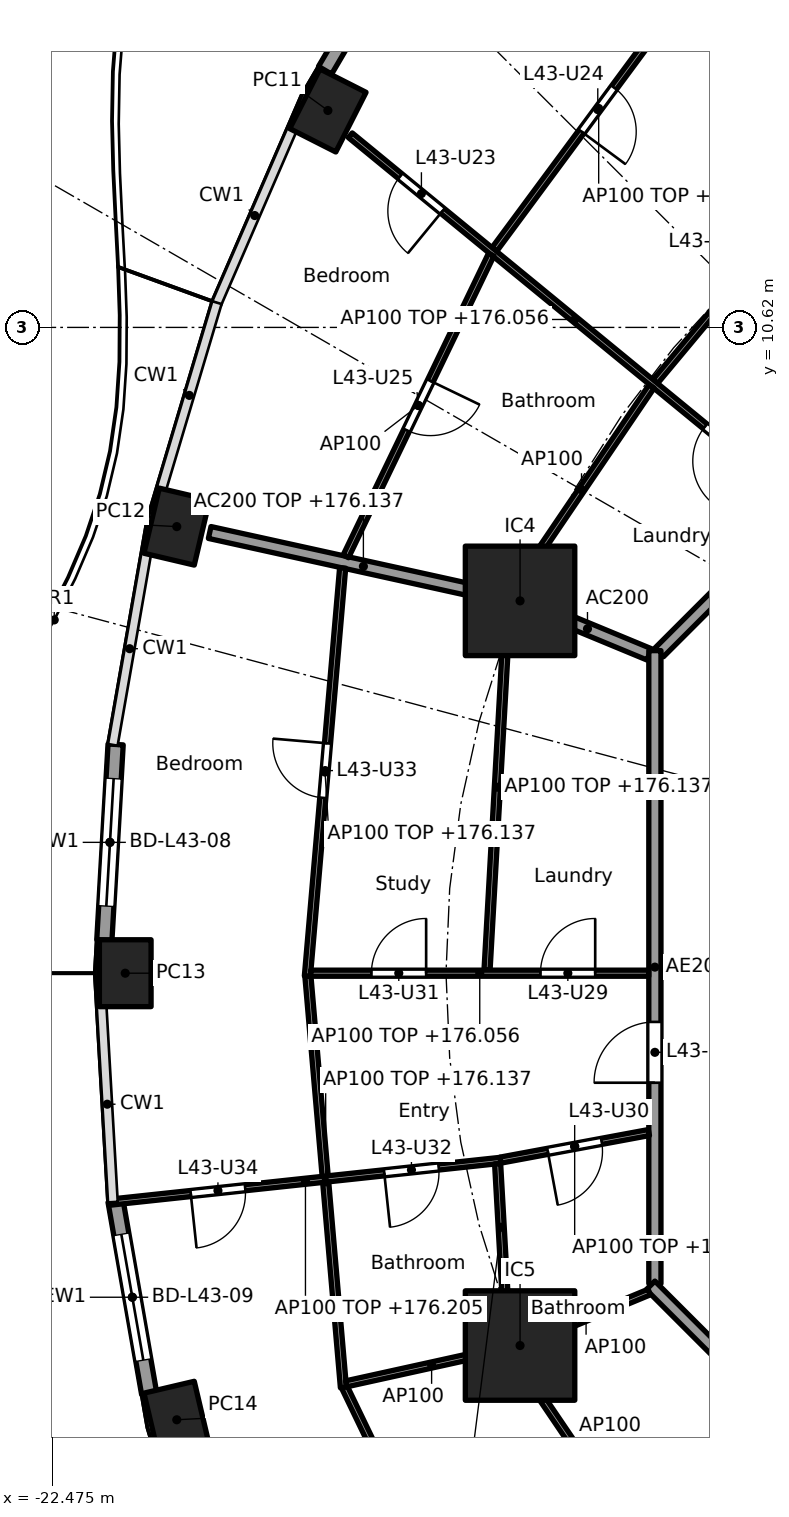
"""IFC4 building model, lengths in metres.
Left out: names, types, materials, properties, quantities, classifications, styles, units other than length and angle.
Written with IfcOpenShell. Run it as: python <this file> out.ifc"""

import sys

from ifc_helpers import new_model, si_unit, direction, frame, frame_2d, origin, origin_2d, place, context, subcontext, project, spatial, rectangle, hollow_rectangle, extrude, element, fill, save


model = new_model("IFC4")
c1 = context("Model", 3, precision=1e-05, world=origin(), true_north=direction((0.0, 1.0)))
c2 = subcontext(c1, "Body", "Model", "MODEL_VIEW")
j1 = project(units=[si_unit("LENGTHUNIT", "METRE"), si_unit("PLANEANGLEUNIT", "RADIAN")], contexts=[c1])
p1 = place(None, origin())
s1 = spatial("IfcSite", under=j1, at=p1, CompositionType="ELEMENT")
p2 = place(p1, origin())
s2 = spatial("IfcBuilding", under=s1, at=p2, CompositionType="ELEMENT")
p3 = place(p2, frame((0.0, 0.0, 173.3)))
s3 = spatial("IfcBuildingStorey", under=s2, at=p3, CompositionType="ELEMENT", Elevation=173.3)
for number, where, z_axis, x_axis in (
    (1, (-17.942, 14.188, 0.0), (0.0, 0.0, 1.0), (-0.452, -0.892, 0.0)),
    (2, (-20.427, 7.344, 0.0), (0.0, 0.0, 1.0), (-0.229, -0.973, 0.0)),
    (3, (-21.275, 0.0, 0.0), (0.0, 0.0, 1.0), (0.0, -1.0, 0.0)),
    (4, (-20.427, -7.344, 0.0), (0.0, 0.0, 1.0), (0.229, -0.973, 0.0)),
):
    element("IfcColumn", number, at=place(p3, frame(where, z_axis=z_axis, x_axis=x_axis)), inside=s3, PredefinedType="COLUMN", context=c2, shape_type="SweptSolid", body=[
        extrude(hollow_rectangle(XDim=1.1, YDim=0.85, WallThickness=0.036, at=origin_2d()), origin(), (0.0, 0.0, 1.0), 3.7),
    ])
for number, where, z_axis, x_axis in (
    (5, (-14.782, 6.123, 0.0), (0.0, 0.0, 1.0), (1.0, 0.0, 0.0)),
    (6, (-14.782, -6.123, 0.0), (0.0, 0.0, 1.0), (1.0, 0.0, 0.0)),
):
    element("IfcColumn", number, at=place(p3, frame(where, z_axis=z_axis, x_axis=x_axis)), inside=s3, PredefinedType="COLUMN", context=c2, shape_type="SweptSolid", body=[
        extrude(rectangle(XDim=1.8, YDim=1.8, at=origin_2d()), origin(), (0.0, 0.0, 1.0), 3.7),
    ])
p4 = place(p3, frame((-17.989, 14.848, 0.0), z_axis=(0.0, 0.0, 1.0), x_axis=(0.506309086483, 0.862352079458, 0.0)))
e7 = element("IfcWall", 7, at=p4, inside=s3, PredefinedType="SOLIDWALL", context=c2, shape_type="SweptSolid", body=[
    extrude(rectangle(XDim=3.092, YDim=0.25, at=frame_2d((1.546, 0.0))), origin(), (0.0, 0.0, 1.0), 3.44),
])
p5 = place(p4, frame((0.496, 0.0, 0.0)))
e8 = element("IfcOpeningElement", 8, at=p5, cuts=e7, PredefinedType="OPENING", context=c2, shape_type="SweptSolid", body=[
    extrude(rectangle(XDim=2.1, YDim=2.4, at=frame_2d((1.05, 1.2))), frame((0.0, 0.135, 0.0), z_axis=(0.0, -1.0, 0.0), x_axis=(1.0, 0.0, 0.0)), (0.0, 0.0, 1.0), 0.27),
])
p6 = place(p3, frame((-21.619, 0.542, 0.0), z_axis=(0.0, 0.0, 1.0), x_axis=(0.057532692854, 0.998343622834, 0.0)))
e9 = element("IfcWall", 9, at=p6, inside=s3, PredefinedType="SOLIDWALL", context=c2, shape_type="SweptSolid", body=[
    extrude(rectangle(XDim=3.225, YDim=0.25, at=frame_2d((1.613, 0.0))), origin(), (0.0, 0.0, 1.0), 3.44),
])
p7 = place(p6, frame((0.562, 0.0, 0.0)))
e10 = element("IfcOpeningElement", 10, at=p7, cuts=e9, PredefinedType="OPENING", context=c2, shape_type="SweptSolid", body=[
    extrude(rectangle(XDim=2.1, YDim=2.4, at=frame_2d((1.05, 1.2))), frame((0.0, 0.135, 0.0), z_axis=(0.0, -1.0, 0.0), x_axis=(1.0, 0.0, 0.0)), (0.0, 0.0, 1.0), 0.27),
])
p8 = place(p3, frame((-20.882, -6.91, 0.0), z_axis=(0.0, 0.0, 1.0), x_axis=(-0.172223552479, 0.98505789067, 0.0)))
e11 = element("IfcWall", 11, at=p8, inside=s3, PredefinedType="SOLIDWALL", context=c2, shape_type="SweptSolid", body=[
    extrude(rectangle(XDim=3.211, YDim=0.25, at=frame_2d((1.605, 0.0))), origin(), (0.0, 0.0, 1.0), 3.44),
])
p9 = place(p8, frame((0.555, 0.0, 0.0)))
e12 = element("IfcOpeningElement", 12, at=p9, cuts=e11, PredefinedType="OPENING", context=c2, shape_type="SweptSolid", body=[
    extrude(rectangle(XDim=2.1, YDim=2.4, at=frame_2d((1.05, 1.2))), frame((0.0, 0.135, 0.0), z_axis=(0.0, -1.0, 0.0), x_axis=(1.0, 0.0, 0.0)), (0.0, 0.0, 1.0), 0.27),
])
p10 = place(p3, frame((-12.657, 5.243, 0.0), z_axis=(0.0, 0.0, 1.0), x_axis=(-0.923859888513, 0.38273085373, 0.0)))
e13 = element("IfcWall", 13, at=p10, inside=s3, PredefinedType="PARTITIONING", context=c2, shape_type="SweptSolid", body=[
    extrude(rectangle(XDim=2.199, YDim=0.2, at=frame_2d((1.1, 0.0))), origin(), (0.0, 0.0, 1.0), 3.44),
])
p11 = place(p3, frame((-14.831, 6.134, 0.0), z_axis=(0.0, 0.0, 1.0), x_axis=(-0.976568396888, 0.215207263354, 0.0)))
e14 = element("IfcWall", 14, at=p11, inside=s3, PredefinedType="PARTITIONING", context=c2, shape_type="SweptSolid", body=[
    extrude(rectangle(XDim=5.177, YDim=0.2, at=frame_2d((2.588, 0.0))), origin(), (0.0, 0.0, 1.0), 2.837),
])
p12 = place(p3, frame((-5.275, 12.494, 0.0), z_axis=(0.0, 0.0, 1.0), x_axis=(-0.707106781187, -0.707106781187, 0.0)))
e15 = element("IfcWall", 15, at=p12, inside=s3, PredefinedType="PARTITIONING", context=c2, shape_type="SweptSolid", body=[
    extrude(rectangle(XDim=10.209, YDim=0.2, at=frame_2d((5.104, 0.0))), origin(), (0.0, 0.0, 1.0), 3.44),
])
p13 = place(p3, frame((-12.565, 5.304, 0.0), z_axis=(0.0, 0.0, 1.0), x_axis=(0.0, -1.0, 0.0)))
e16 = element("IfcWall", 16, at=p13, inside=s3, PredefinedType="PARTITIONING", context=c2, shape_type="SweptSolid", body=[
    extrude(rectangle(XDim=10.409, YDim=0.2, at=frame_2d((5.205, 0.0))), origin(), (0.0, 0.0, 1.0), 3.44),
])
p14 = place(p13, frame((6.106, 0.0, 0.0)))
e17 = element("IfcOpeningElement", 17, at=p14, cuts=e16, PredefinedType="OPENING", context=c2, shape_type="SweptSolid", body=[
    extrude(rectangle(XDim=1.0, YDim=2.1, at=frame_2d((0.5, 1.05))), frame((0.0, 0.11, 0.0), z_axis=(0.0, -1.0, 0.0), x_axis=(1.0, 0.0, 0.0)), (0.0, 0.0, 1.0), 0.22),
])
p15 = place(p3, frame((-12.635, -5.134, 0.0), z_axis=(0.0, 0.0, 1.0), x_axis=(0.707106781187, -0.707106781187, 0.0)))
e18 = element("IfcWall", 18, at=p15, inside=s3, PredefinedType="PARTITIONING", context=c2, shape_type="SweptSolid", body=[
    extrude(rectangle(XDim=10.609, YDim=0.2, at=frame_2d((5.305, 0.0))), origin(), (0.0, 0.0, 1.0), 3.44),
])
p16 = place(p3, frame((-9.631, 13.242, 0.0), z_axis=(0.0, 0.0, 1.0), x_axis=(-0.640315711982, -0.768111833647, 0.0)))
e19 = element("IfcWall", 19, at=p16, inside=s3, PredefinedType="PARTITIONING", context=c2, shape_type="SweptSolid", body=[
    extrude(rectangle(XDim=4.572, YDim=0.1, at=frame_2d((2.286, 0.0))), origin(), (0.0, 0.0, 1.0), 2.837),
])
p17 = place(p16, frame((1.861, 0.0, 0.0)))
e20 = element("IfcOpeningElement", 20, at=p17, cuts=e19, PredefinedType="OPENING", context=c2, shape_type="SweptSolid", body=[
    extrude(rectangle(XDim=0.9, YDim=2.1, at=frame_2d((0.45, 1.05))), frame((0.0, 0.06, 0.0), z_axis=(0.0, -1.0, 0.0), x_axis=(1.0, 0.0, 0.0)), (0.0, 0.0, 1.0), 0.12),
])
p18 = place(p3, frame((-11.773, 16.542, 0.0), z_axis=(0.0, 0.0, 1.0), x_axis=(-0.594694305999, -0.803951915485, 0.0)))
e21 = element("IfcWall", 21, at=p18, inside=s3, PredefinedType="PARTITIONING", context=c2, shape_type="SweptSolid", body=[
    extrude(rectangle(XDim=5.772, YDim=0.1, at=frame_2d((2.886, 0.0))), origin(), (0.0, 0.0, 1.0), 2.837),
])
p19 = place(p18, frame((2.461, 0.0, 0.0)))
e22 = element("IfcOpeningElement", 22, at=p19, cuts=e21, PredefinedType="OPENING", context=c2, shape_type="SweptSolid", body=[
    extrude(rectangle(XDim=0.9, YDim=2.1, at=frame_2d((0.45, 1.05))), frame((0.0, 0.06, 0.0), z_axis=(0.0, -1.0, 0.0), x_axis=(1.0, 0.0, 0.0)), (0.0, 0.0, 1.0), 0.12),
])
p20 = place(p3, frame((-10.189, 7.721, 0.0), z_axis=(0.0, 0.0, 1.0), x_axis=(-0.773134429339, 0.634242188892, 0.0)))
e23 = element("IfcWall", 23, at=p20, inside=s3, PredefinedType="PARTITIONING", context=c2, shape_type="SweptSolid", body=[
    extrude(rectangle(XDim=9.552, YDim=0.1, at=frame_2d((4.776, 0.0))), origin(), (0.0, 0.0, 1.0), 2.756),
])
p21 = place(p20, frame((7.59, 0.0, 0.0)))
e24 = element("IfcOpeningElement", 24, at=p21, cuts=e23, PredefinedType="OPENING", context=c2, shape_type="SweptSolid", body=[
    extrude(rectangle(XDim=0.9, YDim=2.1, at=frame_2d((0.45, 1.05))), frame((0.0, 0.06, 0.0), z_axis=(0.0, -1.0, 0.0), x_axis=(1.0, 0.0, 0.0)), (0.0, 0.0, 1.0), 0.12),
])
p22 = place(p20, frame((1.104, 0.0, 0.0)))
e25 = element("IfcOpeningElement", 25, at=p22, cuts=e23, PredefinedType="OPENING", context=c2, shape_type="SweptSolid", body=[
    extrude(rectangle(XDim=0.9, YDim=2.1, at=frame_2d((0.45, 1.05))), frame((0.0, 0.06, 0.0), z_axis=(0.0, -1.0, 0.0), x_axis=(1.0, 0.0, 0.0)), (0.0, 0.0, 1.0), 0.12),
])
p23 = place(p3, frame((-12.619, 9.65, 0.0), z_axis=(0.0, 0.0, 1.0), x_axis=(-0.561046521684, -0.82778427172, 0.0)))
e26 = element("IfcWall", 26, at=p23, inside=s3, PredefinedType="PARTITIONING", context=c2, shape_type="SweptSolid", body=[
    extrude(rectangle(XDim=4.109, YDim=0.1, at=frame_2d((2.054, 0.0))), origin(), (0.0, 0.0, 1.0), 3.44),
])
p24 = place(p3, frame((-15.257, 11.816, 0.0), z_axis=(0.0, 0.0, 1.0), x_axis=(-0.434027506504, -0.900899619046, 0.0)))
e27 = element("IfcWall", 27, at=p24, inside=s3, PredefinedType="PARTITIONING", context=c2, shape_type="SweptSolid", body=[
    extrude(rectangle(XDim=5.508, YDim=0.1, at=frame_2d((2.754, 0.0))), origin(), (0.0, 0.0, 1.0), 3.44),
])
p25 = place(p24, frame((2.304, 0.0, 0.0)))
e28 = element("IfcOpeningElement", 28, at=p25, cuts=e27, PredefinedType="OPENING", context=c2, shape_type="SweptSolid", body=[
    extrude(rectangle(XDim=0.9, YDim=2.1, at=frame_2d((0.45, 1.05))), frame((0.0, 0.06, 0.0), z_axis=(0.0, -1.0, 0.0), x_axis=(1.0, 0.0, 0.0)), (0.0, 0.0, 1.0), 0.12),
])
p26 = place(p3, frame((-14.986, 6.067, 0.0), z_axis=(0.0, 0.0, 1.0), x_axis=(-0.056311398802, -0.998413254302, 0.0)))
e29 = element("IfcWall", 29, at=p26, inside=s3, PredefinedType="PARTITIONING", context=c2, shape_type="SweptSolid", body=[
    extrude(rectangle(XDim=6.026, YDim=0.1, at=frame_2d((3.013, 0.0))), origin(), (0.0, 0.0, 1.0), 2.837),
])
p27 = place(p3, frame((-17.7, 6.664, 0.0), z_axis=(0.0, 0.0, 1.0), x_axis=(-0.086004282666, -0.996294767307, 0.0)))
e30 = element("IfcWall", 30, at=p27, inside=s3, PredefinedType="PARTITIONING", context=c2, shape_type="SweptSolid", body=[
    extrude(rectangle(XDim=6.739, YDim=0.1, at=frame_2d((3.37, 0.0))), origin(), (0.0, 0.0, 1.0), 2.837),
])
p28 = place(p27, frame((2.895, 0.0, 0.0)))
e31 = element("IfcOpeningElement", 31, at=p28, cuts=e30, PredefinedType="OPENING", context=c2, shape_type="SweptSolid", body=[
    extrude(rectangle(XDim=0.9, YDim=2.1, at=frame_2d((0.45, 1.05))), frame((0.0, 0.06, 0.0), z_axis=(0.0, -1.0, 0.0), x_axis=(1.0, 0.0, 0.0)), (0.0, 0.0, 1.0), 0.12),
])
p29 = place(p3, frame((-12.665, 0.0, 0.0), z_axis=(0.0, 0.0, 1.0), x_axis=(-1.0, 0.0, 0.0)))
e32 = element("IfcWall", 32, at=p29, inside=s3, PredefinedType="PARTITIONING", context=c2, shape_type="SweptSolid", body=[
    extrude(rectangle(XDim=5.56, YDim=0.1, at=frame_2d((2.78, 0.0))), origin(), (0.0, 0.0, 1.0), 2.756),
])
p30 = place(p29, frame((0.882, 0.0, 0.0)))
e33 = element("IfcOpeningElement", 33, at=p30, cuts=e32, PredefinedType="OPENING", context=c2, shape_type="SweptSolid", body=[
    extrude(rectangle(XDim=0.9, YDim=2.1, at=frame_2d((0.45, 1.05))), frame((0.0, 0.06, 0.0), z_axis=(0.0, -1.0, 0.0), x_axis=(1.0, 0.0, 0.0)), (0.0, 0.0, 1.0), 0.12),
])
p31 = place(p29, frame((3.662, 0.0, 0.0)))
e34 = element("IfcOpeningElement", 34, at=p31, cuts=e32, PredefinedType="OPENING", context=c2, shape_type="SweptSolid", body=[
    extrude(rectangle(XDim=0.9, YDim=2.1, at=frame_2d((0.45, 1.05))), frame((0.0, 0.06, 0.0), z_axis=(0.0, -1.0, 0.0), x_axis=(1.0, 0.0, 0.0)), (0.0, 0.0, 1.0), 0.12),
])
p32 = place(p3, frame((-18.271, -0.05, 0.0), z_axis=(0.0, 0.0, 1.0), x_axis=(0.086018199227, -0.996293565874, 0.0)))
e35 = element("IfcWall", 35, at=p32, inside=s3, PredefinedType="PARTITIONING", context=c2, shape_type="SweptSolid", body=[
    extrude(rectangle(XDim=6.789, YDim=0.1, at=frame_2d((3.395, 0.0))), origin(), (0.0, 0.0, 1.0), 2.837),
])
p33 = place(p3, frame((-12.663, -2.621, 0.0), z_axis=(0.0, 0.0, 1.0), x_axis=(-0.983176884312, -0.182655999505, 0.0)))
e36 = element("IfcWall", 36, at=p33, inside=s3, PredefinedType="PARTITIONING", context=c2, shape_type="SweptSolid", body=[
    extrude(rectangle(XDim=2.483, YDim=0.1, at=frame_2d((1.242, 0.0))), origin(), (0.0, 0.0, 1.0), 2.756),
])
p34 = place(p33, frame((0.792, 0.0, 0.0)))
e37 = element("IfcOpeningElement", 37, at=p34, cuts=e36, PredefinedType="OPENING", context=c2, shape_type="SweptSolid", body=[
    extrude(rectangle(XDim=0.9, YDim=2.1, at=frame_2d((0.45, 1.05))), frame((0.0, 0.06, 0.0), z_axis=(0.0, -1.0, 0.0), x_axis=(1.0, 0.0, 0.0)), (0.0, 0.0, 1.0), 0.12),
])
p35 = place(p3, frame((-15.104, -3.078, 0.0), z_axis=(0.0, 0.0, 1.0), x_axis=(-0.994316167803, -0.106467640365, 0.0)))
e38 = element("IfcWall", 38, at=p35, inside=s3, PredefinedType="PARTITIONING", context=c2, shape_type="SweptSolid", body=[
    extrude(rectangle(XDim=6.45, YDim=0.1, at=frame_2d((3.225, 0.0))), origin(), (0.0, 0.0, 1.0), 2.905),
])
p36 = place(p35, frame((1.022, 0.0, 0.0)))
e39 = element("IfcOpeningElement", 39, at=p36, cuts=e38, PredefinedType="OPENING", context=c2, shape_type="SweptSolid", body=[
    extrude(rectangle(XDim=0.9, YDim=2.1, at=frame_2d((0.45, 1.05))), frame((0.0, 0.06, 0.0), z_axis=(0.0, -1.0, 0.0), x_axis=(1.0, 0.0, 0.0)), (0.0, 0.0, 1.0), 0.12),
])
p37 = place(p35, frame((4.223, 0.0, 0.0)))
e40 = element("IfcOpeningElement", 40, at=p37, cuts=e38, PredefinedType="OPENING", context=c2, shape_type="SweptSolid", body=[
    extrude(rectangle(XDim=0.9, YDim=2.1, at=frame_2d((0.45, 1.05))), frame((0.0, 0.06, 0.0), z_axis=(0.0, -1.0, 0.0), x_axis=(1.0, 0.0, 0.0)), (0.0, 0.0, 1.0), 0.12),
])
p38 = place(p3, frame((-15.151, -3.133, 0.0), z_axis=(0.0, 0.0, 1.0), x_axis=(0.05637501378, -0.998409664327, 0.0)))
e41 = element("IfcWall", 41, at=p38, inside=s3, PredefinedType="PARTITIONING", context=c2, shape_type="SweptSolid", body=[
    extrude(rectangle(XDim=2.988, YDim=0.1, at=frame_2d((1.494, 0.0))), origin(), (0.0, 0.0, 1.0), 2.837),
])
p39 = place(p3, frame((-12.657, -5.243, 0.0), z_axis=(0.0, 0.0, 1.0), x_axis=(-0.923848837015, -0.382757529444, 0.0)))
e42 = element("IfcWall", 42, at=p39, inside=s3, PredefinedType="PARTITIONING", context=c2, shape_type="SweptSolid", body=[
    extrude(rectangle(XDim=2.25, YDim=0.1, at=frame_2d((1.125, 0.0))), origin(), (0.0, 0.0, 1.0), 3.44),
])
p40 = place(p3, frame((-14.831, -6.134, 0.0), z_axis=(0.0, 0.0, 1.0), x_axis=(-0.976560749847, -0.215241961191, 0.0)))
e43 = element("IfcWall", 43, at=p40, inside=s3, PredefinedType="PARTITIONING", context=c2, shape_type="SweptSolid", body=[
    extrude(rectangle(XDim=2.879, YDim=0.1, at=frame_2d((1.439, 0.0))), origin(), (0.0, 0.0, 1.0), 3.44),
])
p41 = place(p3, frame((-14.952, -6.208, 0.0), z_axis=(0.0, 0.0, 1.0), x_axis=(0.561064907171, -0.827771810308, 0.0)))
e44 = element("IfcWall", 44, at=p41, inside=s3, PredefinedType="PARTITIONING", context=c2, shape_type="SweptSolid", body=[
    extrude(rectangle(XDim=4.159, YDim=0.1, at=frame_2d((2.079, 0.0))), origin(), (0.0, 0.0, 1.0), 3.44),
])
p42 = place(p3, frame((-17.669, -6.809, 0.0), z_axis=(0.0, 0.0, 1.0), x_axis=(0.434040130629, -0.900893536997, 0.0)))
e45 = element("IfcWall", 45, at=p42, inside=s3, PredefinedType="PARTITIONING", context=c2, shape_type="SweptSolid", body=[
    extrude(rectangle(XDim=5.558, YDim=0.1, at=frame_2d((2.779, 0.0))), origin(), (0.0, 0.0, 1.0), 3.44),
])
p43 = place(p42, frame((2.329, 0.0, 0.0)))
e46 = element("IfcOpeningElement", 46, at=p43, cuts=e45, PredefinedType="OPENING", context=c2, shape_type="SweptSolid", body=[
    extrude(rectangle(XDim=0.9, YDim=2.1, at=frame_2d((0.45, 1.05))), frame((0.0, 0.06, 0.0), z_axis=(0.0, -1.0, 0.0), x_axis=(1.0, 0.0, 0.0)), (0.0, 0.0, 1.0), 0.12),
])
p44 = place(p7, origin())
e47 = element("IfcDoor", 47, at=p44, inside=s3, OperationType="SLIDING_TO_LEFT", PredefinedType="DOOR", context=c2, shape_type="SweptSolid", body=[
    extrude(rectangle(XDim=2.1, YDim=2.4, at=frame_2d((1.05, 1.2))), frame((0.0, 0.025, 0.0), z_axis=(0.0, -1.0, 0.0), x_axis=(1.0, 0.0, 0.0)), (0.0, 0.0, 1.0), 0.05),
])
fill(e10, e47)
p45 = place(p9, origin())
e48 = element("IfcDoor", 48, at=p45, inside=s3, OperationType="SLIDING_TO_LEFT", PredefinedType="DOOR", context=c2, shape_type="SweptSolid", body=[
    extrude(rectangle(XDim=2.1, YDim=2.4, at=frame_2d((1.05, 1.2))), frame((0.0, 0.025, 0.0), z_axis=(0.0, -1.0, 0.0), x_axis=(1.0, 0.0, 0.0)), (0.0, 0.0, 1.0), 0.05),
])
fill(e12, e48)
p46 = place(p21, origin())
e49 = element("IfcDoor", 49, at=p46, inside=s3, OperationType="SINGLE_SWING_LEFT", PredefinedType="DOOR", context=c2, shape_type="SweptSolid", body=[
    extrude(rectangle(XDim=0.9, YDim=2.1, at=frame_2d((0.45, 1.05))), frame((0.0, 0.025, 0.0), z_axis=(0.0, -1.0, 0.0), x_axis=(1.0, 0.0, 0.0)), (0.0, 0.0, 1.0), 0.05),
])
fill(e24, e49)
p47 = place(p19, origin())
e50 = element("IfcDoor", 50, at=p47, inside=s3, OperationType="SINGLE_SWING_RIGHT", PredefinedType="DOOR", context=c2, shape_type="SweptSolid", body=[
    extrude(rectangle(XDim=0.9, YDim=2.1, at=frame_2d((0.45, 1.05))), frame((0.0, 0.025, 0.0), z_axis=(0.0, -1.0, 0.0), x_axis=(1.0, 0.0, 0.0)), (0.0, 0.0, 1.0), 0.05),
])
fill(e22, e50)
p48 = place(p25, origin())
e51 = element("IfcDoor", 51, at=p48, inside=s3, OperationType="SINGLE_SWING_LEFT", PredefinedType="DOOR", context=c2, shape_type="SweptSolid", body=[
    extrude(rectangle(XDim=0.9, YDim=2.1, at=frame_2d((0.45, 1.05))), frame((0.0, 0.025, 0.0), z_axis=(0.0, -1.0, 0.0), x_axis=(1.0, 0.0, 0.0)), (0.0, 0.0, 1.0), 0.05),
])
fill(e28, e51)
p49 = place(p22, origin())
e52 = element("IfcDoor", 52, at=p49, inside=s3, OperationType="SINGLE_SWING_LEFT", PredefinedType="DOOR", context=c2, shape_type="SweptSolid", body=[
    extrude(rectangle(XDim=0.9, YDim=2.1, at=frame_2d((0.45, 1.05))), frame((0.0, 0.025, 0.0), z_axis=(0.0, -1.0, 0.0), x_axis=(1.0, 0.0, 0.0)), (0.0, 0.0, 1.0), 0.05),
])
fill(e25, e52)
p50 = place(p14, frame((1.0, 0.0, 0.0), x_axis=(-1.0, 0.0, 0.0)))
e53 = element("IfcDoor", 53, at=p50, inside=s3, OperationType="SINGLE_SWING_LEFT", PredefinedType="DOOR", context=c2, shape_type="SweptSolid", body=[
    extrude(rectangle(XDim=1.0, YDim=2.1, at=frame_2d((0.5, 1.05))), frame((0.0, 0.025, 0.0), z_axis=(0.0, -1.0, 0.0), x_axis=(1.0, 0.0, 0.0)), (0.0, 0.0, 1.0), 0.05),
])
fill(e17, e53)
p51 = place(p30, frame((0.9, 0.0, 0.0), x_axis=(-1.0, 0.0, 0.0)))
e54 = element("IfcDoor", 54, at=p51, inside=s3, OperationType="SINGLE_SWING_RIGHT", PredefinedType="DOOR", context=c2, shape_type="SweptSolid", body=[
    extrude(rectangle(XDim=0.9, YDim=2.1, at=frame_2d((0.45, 1.05))), frame((0.0, 0.025, 0.0), z_axis=(0.0, -1.0, 0.0), x_axis=(1.0, 0.0, 0.0)), (0.0, 0.0, 1.0), 0.05),
])
fill(e33, e54)
p52 = place(p34, origin())
e55 = element("IfcDoor", 55, at=p52, inside=s3, OperationType="SINGLE_SWING_RIGHT", PredefinedType="DOOR", context=c2, shape_type="SweptSolid", body=[
    extrude(rectangle(XDim=0.9, YDim=2.1, at=frame_2d((0.45, 1.05))), frame((0.0, 0.025, 0.0), z_axis=(0.0, -1.0, 0.0), x_axis=(1.0, 0.0, 0.0)), (0.0, 0.0, 1.0), 0.05),
])
fill(e37, e55)
p53 = place(p31, frame((0.9, 0.0, 0.0), x_axis=(-1.0, 0.0, 0.0)))
e56 = element("IfcDoor", 56, at=p53, inside=s3, OperationType="SINGLE_SWING_RIGHT", PredefinedType="DOOR", context=c2, shape_type="SweptSolid", body=[
    extrude(rectangle(XDim=0.9, YDim=2.1, at=frame_2d((0.45, 1.05))), frame((0.0, 0.025, 0.0), z_axis=(0.0, -1.0, 0.0), x_axis=(1.0, 0.0, 0.0)), (0.0, 0.0, 1.0), 0.05),
])
fill(e34, e56)
p54 = place(p36, origin())
e57 = element("IfcDoor", 57, at=p54, inside=s3, OperationType="SINGLE_SWING_RIGHT", PredefinedType="DOOR", context=c2, shape_type="SweptSolid", body=[
    extrude(rectangle(XDim=0.9, YDim=2.1, at=frame_2d((0.45, 1.05))), frame((0.0, 0.025, 0.0), z_axis=(0.0, -1.0, 0.0), x_axis=(1.0, 0.0, 0.0)), (0.0, 0.0, 1.0), 0.05),
])
fill(e39, e57)
p55 = place(p28, frame((0.9, 0.0, 0.0), x_axis=(-1.0, 0.0, 0.0)))
e58 = element("IfcDoor", 58, at=p55, inside=s3, OperationType="SINGLE_SWING_RIGHT", PredefinedType="DOOR", context=c2, shape_type="SweptSolid", body=[
    extrude(rectangle(XDim=0.9, YDim=2.1, at=frame_2d((0.45, 1.05))), frame((0.0, 0.025, 0.0), z_axis=(0.0, -1.0, 0.0), x_axis=(1.0, 0.0, 0.0)), (0.0, 0.0, 1.0), 0.05),
])
fill(e31, e58)
p56 = place(p37, origin())
e59 = element("IfcDoor", 59, at=p56, inside=s3, OperationType="SINGLE_SWING_RIGHT", PredefinedType="DOOR", context=c2, shape_type="SweptSolid", body=[
    extrude(rectangle(XDim=0.9, YDim=2.1, at=frame_2d((0.45, 1.05))), frame((0.0, 0.025, 0.0), z_axis=(0.0, -1.0, 0.0), x_axis=(1.0, 0.0, 0.0)), (0.0, 0.0, 1.0), 0.05),
])
fill(e40, e59)
save(model, sys.argv[1])
